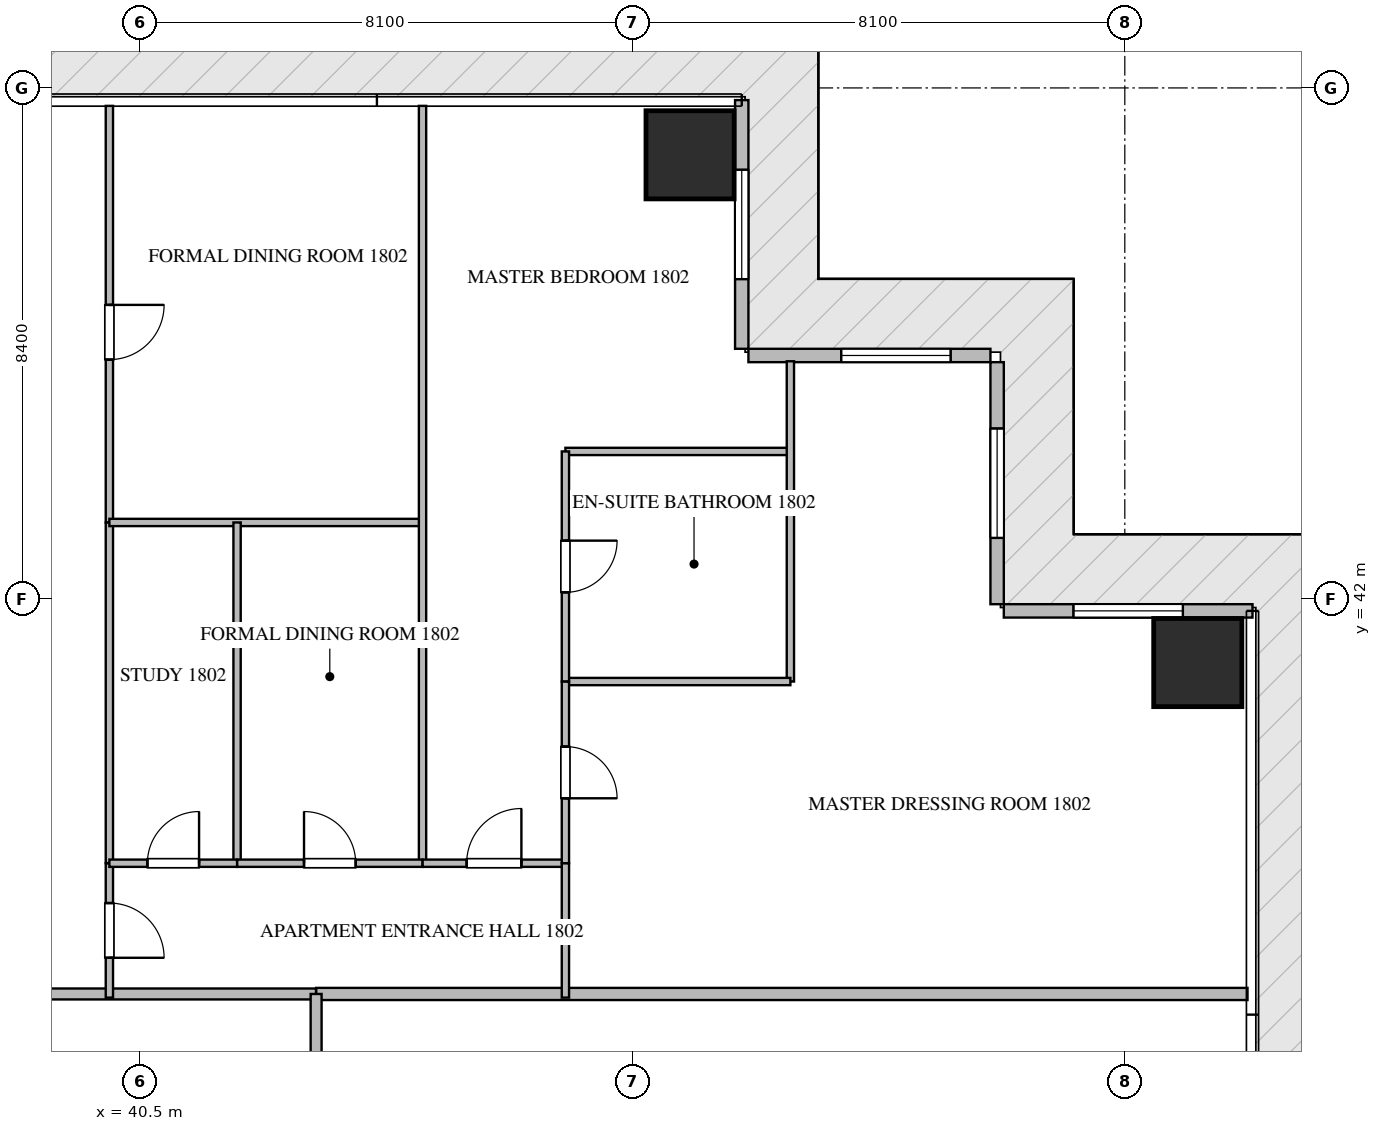
"""IFC4 building model, lengths in metres.
Left out: names, types, materials, properties, quantities, classifications, styles, units other than length and angle.
Written with IfcOpenShell. Run it as: python <this file> out.ifc"""

import sys

from ifc_helpers import new_model, si_unit, direction, frame, frame_2d, origin, origin_2d, place, context, subcontext, project, spatial, rectangle, extrude, source, transform, mapped, element, fill, save


model = new_model("IFC4")
c1 = context("Model", 3, precision=1e-05, world=origin(), true_north=direction((0.0, 1.0)))
c2 = subcontext(c1, "Body", "Model", "MODEL_VIEW")
j1 = project(units=[si_unit("LENGTHUNIT", "METRE"), si_unit("PLANEANGLEUNIT", "RADIAN")], contexts=[c1])
p1 = place(None, origin())
s1 = spatial("IfcSite", under=j1, at=p1, CompositionType="ELEMENT")
p2 = place(p1, origin())
s2 = spatial("IfcBuilding", under=s1, at=p2, CompositionType="ELEMENT")
p3 = place(p2, frame((0.0, 0.0, 75.45)))
s3 = spatial("IfcBuildingStorey", under=s2, at=p3, CompositionType="ELEMENT", Elevation=75.45)
m1 = source(origin(), c2, "Body", "SweptSolid", [
    extrude(rectangle(XDim=1.45, YDim=1.45, at=origin_2d()), origin(), (0.0, 0.0, 1.0), 3.75),
])
for number, where, z_axis, x_axis in (
    (1, (49.55, 49.3, -0.26), (0.0, 0.0, 1.0), (1.0, 0.0, 0.0)),
    (2, (57.9, 40.95, -0.26), (0.0, 0.0, 1.0), (1.0, 0.0, 0.0)),
):
    element("IfcColumn", number, at=place(p3, frame(where, z_axis=z_axis, x_axis=x_axis)), inside=s3, PredefinedType="COLUMN", context=c2, shape_type="MappedRepresentation", body=[
        mapped(m1, transform((0.0, 0.0, 0.0), scale=1.0)),
    ])
p4 = place(p3, frame((58.8, 41.8, 0.0), z_axis=(0.0, 0.0, 1.0), x_axis=(-1.0, 0.0, 0.0)))
e3 = element("IfcWall", 3, at=p4, inside=s3, PredefinedType="ELEMENTEDWALL", context=c2, shape_type="SweptSolid", body=[
    extrude(rectangle(XDim=4.09, YDim=0.22, at=frame_2d((2.045, 0.0))), origin(), (0.0, 0.0, 1.0), 3.475),
])
p5 = place(p4, frame((1.145, 0.0, 0.65)))
e4 = element("IfcOpeningElement", 4, at=p5, cuts=e3, PredefinedType="OPENING", context=c2, shape_type="SweptSolid", body=[
    extrude(rectangle(XDim=1.8, YDim=2.1, at=frame_2d((0.9, 1.05))), frame((0.0, 0.12, 0.0), z_axis=(0.0, -1.0, 0.0), x_axis=(1.0, 0.0, 0.0)), (0.0, 0.0, 1.0), 0.24),
])
p6 = place(p3, frame((54.6, 41.91, 0.0), z_axis=(0.0, 0.0, 1.0), x_axis=(0.0, 1.0, 0.0)))
e5 = element("IfcWall", 5, at=p6, inside=s3, PredefinedType="ELEMENTEDWALL", context=c2, shape_type="SweptSolid", body=[
    extrude(rectangle(XDim=3.98, YDim=0.22, at=frame_2d((1.99, 0.0))), origin(), (0.0, 0.0, 1.0), 3.475),
])
p7 = place(p6, frame((1.09, 0.0, 0.65)))
e6 = element("IfcOpeningElement", 6, at=p7, cuts=e5, PredefinedType="OPENING", context=c2, shape_type="SweptSolid", body=[
    extrude(rectangle(XDim=1.8, YDim=2.1, at=frame_2d((0.9, 1.05))), frame((0.0, 0.12, 0.0), z_axis=(0.0, -1.0, 0.0), x_axis=(1.0, 0.0, 0.0)), (0.0, 0.0, 1.0), 0.24),
])
p8 = place(p3, frame((54.49, 46.0, 0.0), z_axis=(0.0, 0.0, 1.0), x_axis=(-1.0, 0.0, 0.0)))
e7 = element("IfcWall", 7, at=p8, inside=s3, PredefinedType="ELEMENTEDWALL", context=c2, shape_type="SweptSolid", body=[
    extrude(rectangle(XDim=3.98, YDim=0.22, at=frame_2d((1.99, 0.0))), origin(), (0.0, 0.0, 1.0), 3.475),
])
p9 = place(p8, frame((0.654, 0.0, 0.65)))
e8 = element("IfcOpeningElement", 8, at=p9, cuts=e7, PredefinedType="OPENING", context=c2, shape_type="SweptSolid", body=[
    extrude(rectangle(XDim=1.8, YDim=2.1, at=frame_2d((0.9, 1.05))), frame((0.0, 0.12, 0.0), z_axis=(0.0, -1.0, 0.0), x_axis=(1.0, 0.0, 0.0)), (0.0, 0.0, 1.0), 0.24),
])
p10 = place(p3, frame((50.4, 46.11, 0.0), z_axis=(0.0, 0.0, 1.0), x_axis=(0.0, 1.0, 0.0)))
e9 = element("IfcWall", 9, at=p10, inside=s3, PredefinedType="ELEMENTEDWALL", context=c2, shape_type="SweptSolid", body=[
    extrude(rectangle(XDim=4.09, YDim=0.22, at=frame_2d((2.045, 0.0))), origin(), (0.0, 0.0, 1.0), 3.475),
])
p11 = place(p10, frame((1.145, 0.0, 0.65)))
e10 = element("IfcOpeningElement", 10, at=p11, cuts=e9, PredefinedType="OPENING", context=c2, shape_type="SweptSolid", body=[
    extrude(rectangle(XDim=1.8, YDim=2.1, at=frame_2d((0.9, 1.05))), frame((0.0, 0.12, 0.0), z_axis=(0.0, -1.0, 0.0), x_axis=(1.0, 0.0, 0.0)), (0.0, 0.0, 1.0), 0.24),
])
p12 = place(p3, frame((43.4, 35.5, 0.0), z_axis=(0.0, 0.0, 1.0), x_axis=(1.0, 0.0, 0.0)))
e11 = element("IfcWall", 11, at=p12, inside=s3, PredefinedType="PARTITIONING", context=c2, shape_type="SweptSolid", body=[
    extrude(rectangle(XDim=15.318, YDim=0.2, at=frame_2d((7.659, 0.0))), origin(), (0.0, 0.0, 1.0), 3.49),
])
p13 = place(p3, frame((21.402, 35.5, 0.0), z_axis=(0.0, 0.0, 1.0), x_axis=(1.0, 0.0, 0.0)))
e12 = element("IfcWall", 12, at=p13, inside=s3, PredefinedType="PARTITIONING", context=c2, shape_type="SweptSolid", body=[
    extrude(rectangle(XDim=21.996, YDim=0.18, at=frame_2d((10.998, 0.0))), origin(), (0.0, 0.0, 1.0), 3.49),
])
p14 = place(p13, frame((15.222, 0.0, 0.0)))
e13 = element("IfcOpeningElement", 13, at=p14, cuts=e12, PredefinedType="OPENING", context=c2, shape_type="SweptSolid", body=[
    extrude(rectangle(XDim=1.0, YDim=2.15, at=frame_2d((0.5, 1.075))), frame((0.0, 0.1, 0.0), z_axis=(0.0, -1.0, 0.0), x_axis=(1.0, 0.0, 0.0)), (0.0, 0.0, 1.0), 0.2),
])
p15 = place(p3, frame((43.4, 14.9, 0.0), z_axis=(0.0, 0.0, 1.0), x_axis=(0.0, 1.0, 0.0)))
e14 = element("IfcWall", 14, at=p15, inside=s3, PredefinedType="PARTITIONING", context=c2, shape_type="SweptSolid", body=[
    extrude(rectangle(XDim=20.6, YDim=0.18, at=frame_2d((10.3, 0.0))), origin(), (0.0, 0.0, 1.0), 3.49),
])
p16 = place(p15, frame((17.64, 0.0, 0.0)))
e15 = element("IfcOpeningElement", 15, at=p16, cuts=e14, PredefinedType="OPENING", context=c2, shape_type="SweptSolid", body=[
    extrude(rectangle(XDim=1.0, YDim=2.15, at=frame_2d((0.5, 1.075))), frame((0.0, 0.1, 0.0), z_axis=(0.0, -1.0, 0.0), x_axis=(1.0, 0.0, 0.0)), (0.0, 0.0, 1.0), 0.2),
])
p17 = place(p3, frame((40.0, 37.65, 0.0), z_axis=(0.0, 0.0, 1.0), x_axis=(0.0, -1.0, 0.0)))
e16 = element("IfcWall", 16, at=p17, inside=s3, PredefinedType="PARTITIONING", context=c2, shape_type="SweptSolid", body=[
    extrude(rectangle(XDim=2.21, YDim=0.12, at=frame_2d((1.105, 0.0))), origin(), (0.0, 0.0, 1.0), 3.49),
])
p18 = place(p17, frame((0.655, 0.0, 0.0)))
e17 = element("IfcOpeningElement", 17, at=p18, cuts=e16, PredefinedType="OPENING", context=c2, shape_type="SweptSolid", body=[
    extrude(rectangle(XDim=0.9, YDim=2.1, at=frame_2d((0.45, 1.05))), frame((0.0, 0.07, 0.0), z_axis=(0.0, -1.0, 0.0), x_axis=(1.0, 0.0, 0.0)), (0.0, 0.0, 1.0), 0.14),
])
p19 = place(p3, frame((40.0, 50.105, 0.0), z_axis=(0.0, 0.0, 1.0), x_axis=(0.0, -1.0, 0.0)))
e18 = element("IfcWall", 18, at=p19, inside=s3, PredefinedType="PARTITIONING", context=c2, shape_type="SweptSolid", body=[
    extrude(rectangle(XDim=6.851, YDim=0.12, at=frame_2d((3.426, 0.0))), origin(), (0.0, 0.0, 1.0), 3.49),
])
p20 = place(p19, frame((3.273, 0.0, 0.0)))
e19 = element("IfcOpeningElement", 19, at=p20, cuts=e18, PredefinedType="OPENING", context=c2, shape_type="SweptSolid", body=[
    extrude(rectangle(XDim=0.9, YDim=2.1, at=frame_2d((0.45, 1.05))), frame((0.0, 0.07, 0.0), z_axis=(0.0, -1.0, 0.0), x_axis=(1.0, 0.0, 0.0)), (0.0, 0.0, 1.0), 0.14),
])
p21 = place(p3, frame((40.0, 43.252, 0.0), z_axis=(0.0, 0.0, 1.0), x_axis=(0.0, -1.0, 0.0)))
e20 = element("IfcWall", 20, at=p21, inside=s3, PredefinedType="PARTITIONING", context=c2, shape_type="SweptSolid", body=[
    extrude(rectangle(XDim=5.6, YDim=0.12, at=frame_2d((2.8, 0.0))), origin(), (0.0, 0.0, 1.0), 3.49),
])
p22 = place(p3, frame((40.0, 43.254, 0.0), z_axis=(0.0, 0.0, 1.0), x_axis=(1.0, 0.0, 0.0)))
e21 = element("IfcWall", 21, at=p22, inside=s3, PredefinedType="PARTITIONING", context=c2, shape_type="SweptSolid", body=[
    extrude(rectangle(XDim=5.15, YDim=0.12, at=frame_2d((2.575, 0.0))), origin(), (0.0, 0.0, 1.0), 3.49),
])
p23 = place(p3, frame((45.15, 50.105, 0.0), z_axis=(0.0, 0.0, 1.0), x_axis=(0.0, -1.0, 0.0)))
e22 = element("IfcWall", 22, at=p23, inside=s3, PredefinedType="PARTITIONING", context=c2, shape_type="SweptSolid", body=[
    extrude(rectangle(XDim=12.455, YDim=0.12, at=frame_2d((6.228, 0.0))), origin(), (0.0, 0.0, 1.0), 3.49),
])
p24 = place(p3, frame((42.1, 43.254, 0.0), z_axis=(0.0, 0.0, 1.0), x_axis=(0.0, -1.0, 0.0)))
e23 = element("IfcWall", 23, at=p24, inside=s3, PredefinedType="PARTITIONING", context=c2, shape_type="SweptSolid", body=[
    extrude(rectangle(XDim=5.604, YDim=0.12, at=frame_2d((2.802, 0.0))), origin(), (0.0, 0.0, 1.0), 3.49),
])
p25 = place(p3, frame((40.0, 37.65, 0.0), z_axis=(0.0, 0.0, 1.0), x_axis=(1.0, 0.0, 0.0)))
e24 = element("IfcWall", 24, at=p25, inside=s3, PredefinedType="PARTITIONING", context=c2, shape_type="SweptSolid", body=[
    extrude(rectangle(XDim=2.1, YDim=0.12, at=frame_2d((1.05, 0.0))), origin(), (0.0, 0.0, 1.0), 3.49),
])
p26 = place(p25, frame((0.625, 0.0, 0.0)))
e25 = element("IfcOpeningElement", 25, at=p26, cuts=e24, PredefinedType="OPENING", context=c2, shape_type="SweptSolid", body=[
    extrude(rectangle(XDim=0.85, YDim=2.1, at=frame_2d((0.425, 1.05))), frame((0.0, 0.07, 0.0), z_axis=(0.0, -1.0, 0.0), x_axis=(1.0, 0.0, 0.0)), (0.0, 0.0, 1.0), 0.14),
])
p27 = place(p3, frame((42.102, 37.65, 0.0), z_axis=(0.0, 0.0, 1.0), x_axis=(1.0, 0.0, 0.0)))
e26 = element("IfcWall", 26, at=p27, inside=s3, PredefinedType="PARTITIONING", context=c2, shape_type="SweptSolid", body=[
    extrude(rectangle(XDim=3.048, YDim=0.12, at=frame_2d((1.524, 0.0))), origin(), (0.0, 0.0, 1.0), 3.49),
])
p28 = place(p27, frame((1.099, 0.0, 0.0)))
e27 = element("IfcOpeningElement", 27, at=p28, cuts=e26, PredefinedType="OPENING", context=c2, shape_type="SweptSolid", body=[
    extrude(rectangle(XDim=0.85, YDim=2.1, at=frame_2d((0.425, 1.05))), frame((0.0, 0.07, 0.0), z_axis=(0.0, -1.0, 0.0), x_axis=(1.0, 0.0, 0.0)), (0.0, 0.0, 1.0), 0.14),
])
p29 = place(p3, frame((45.152, 37.65, 0.0), z_axis=(0.0, 0.0, 1.0), x_axis=(1.0, 0.0, 0.0)))
e28 = element("IfcWall", 28, at=p29, inside=s3, PredefinedType="PARTITIONING", context=c2, shape_type="SweptSolid", body=[
    extrude(rectangle(XDim=2.348, YDim=0.12, at=frame_2d((1.174, 0.0))), origin(), (0.0, 0.0, 1.0), 3.49),
])
p30 = place(p29, frame((0.724, 0.0, 0.0)))
e29 = element("IfcOpeningElement", 29, at=p30, cuts=e28, PredefinedType="OPENING", context=c2, shape_type="SweptSolid", body=[
    extrude(rectangle(XDim=0.9, YDim=2.1, at=frame_2d((0.45, 1.05))), frame((0.0, 0.07, 0.0), z_axis=(0.0, -1.0, 0.0), x_axis=(1.0, 0.0, 0.0)), (0.0, 0.0, 1.0), 0.14),
])
p31 = place(p3, frame((47.5, 44.422, 0.0), z_axis=(0.0, 0.0, 1.0), x_axis=(1.0, 0.0, 0.0)))
e30 = element("IfcWall", 30, at=p31, inside=s3, PredefinedType="PARTITIONING", context=c2, shape_type="SweptSolid", body=[
    extrude(rectangle(XDim=3.7, YDim=0.12, at=frame_2d((1.85, 0.0))), origin(), (0.0, 0.0, 1.0), 3.49),
])
p32 = place(p3, frame((51.2, 45.905, 0.0), z_axis=(0.0, 0.0, 1.0), x_axis=(0.0, -1.0, 0.0)))
e31 = element("IfcWall", 31, at=p32, inside=s3, PredefinedType="PARTITIONING", context=c2, shape_type="SweptSolid", body=[
    extrude(rectangle(XDim=5.267, YDim=0.12, at=frame_2d((2.634, 0.0))), origin(), (0.0, 0.0, 1.0), 3.49),
])
p33 = place(p3, frame((47.5, 40.638, 0.0), z_axis=(0.0, 0.0, 1.0), x_axis=(1.0, 0.0, 0.0)))
e32 = element("IfcWall", 32, at=p33, inside=s3, PredefinedType="PARTITIONING", context=c2, shape_type="SweptSolid", body=[
    extrude(rectangle(XDim=3.7, YDim=0.12, at=frame_2d((1.85, 0.0))), origin(), (0.0, 0.0, 1.0), 3.49),
])
p34 = place(p3, frame((47.5, 44.422, 0.0), z_axis=(0.0, 0.0, 1.0), x_axis=(0.0, -1.0, 0.0)))
e33 = element("IfcWall", 33, at=p34, inside=s3, PredefinedType="PARTITIONING", context=c2, shape_type="SweptSolid", body=[
    extrude(rectangle(XDim=3.784, YDim=0.12, at=frame_2d((1.892, 0.0))), origin(), (0.0, 0.0, 1.0), 3.49),
])
p35 = place(p34, frame((1.467, 0.0, 0.0)))
e34 = element("IfcOpeningElement", 34, at=p35, cuts=e33, PredefinedType="OPENING", context=c2, shape_type="SweptSolid", body=[
    extrude(rectangle(XDim=0.85, YDim=2.1, at=frame_2d((0.425, 1.05))), frame((0.0, 0.07, 0.0), z_axis=(0.0, -1.0, 0.0), x_axis=(1.0, 0.0, 0.0)), (0.0, 0.0, 1.0), 0.14),
])
p36 = place(p3, frame((47.5, 40.636, 0.0), z_axis=(0.0, 0.0, 1.0), x_axis=(0.0, -1.0, 0.0)))
e35 = element("IfcWall", 35, at=p36, inside=s3, PredefinedType="PARTITIONING", context=c2, shape_type="SweptSolid", body=[
    extrude(rectangle(XDim=2.986, YDim=0.12, at=frame_2d((1.493, 0.0))), origin(), (0.0, 0.0, 1.0), 3.49),
])
p37 = place(p36, frame((1.068, 0.0, 0.0)))
e36 = element("IfcOpeningElement", 36, at=p37, cuts=e35, PredefinedType="OPENING", context=c2, shape_type="SweptSolid", body=[
    extrude(rectangle(XDim=0.85, YDim=2.1, at=frame_2d((0.425, 1.05))), frame((0.0, 0.07, 0.0), z_axis=(0.0, -1.0, 0.0), x_axis=(1.0, 0.0, 0.0)), (0.0, 0.0, 1.0), 0.14),
])
p38 = place(p3, frame((47.5, 37.648, 0.0), z_axis=(0.0, 0.0, 1.0), x_axis=(0.0, -1.0, 0.0)))
e37 = element("IfcWall", 37, at=p38, inside=s3, PredefinedType="PARTITIONING", context=c2, shape_type="SweptSolid", body=[
    extrude(rectangle(XDim=2.208, YDim=0.12, at=frame_2d((1.104, 0.0))), origin(), (0.0, 0.0, 1.0), 3.49),
])
m2 = source(origin(), c2, "Body", "SweptSolid", [
    extrude(rectangle(XDim=1.8, YDim=2.1, at=frame_2d((0.9, 1.05))), frame((0.0, 0.03, 0.0), z_axis=(0.0, -1.0, 0.0), x_axis=(1.0, 0.0, 0.0)), (0.0, 0.0, 1.0), 0.06),
])
p39 = place(p5, origin())
e38 = element("IfcWindow", 38, at=p39, inside=s3, PartitioningType="SINGLE_PANEL", PredefinedType="WINDOW", context=c2, shape_type="MappedRepresentation", body=[
    mapped(m2, transform((0.0, 0.0, 0.0), scale=1.0)),
])
fill(e4, e38)
p40 = place(p7, origin())
e39 = element("IfcWindow", 39, at=p40, inside=s3, PartitioningType="SINGLE_PANEL", PredefinedType="WINDOW", context=c2, shape_type="MappedRepresentation", body=[
    mapped(m2, transform((0.0, 0.0, 0.0), scale=1.0)),
])
fill(e6, e39)
p41 = place(p9, origin())
e40 = element("IfcWindow", 40, at=p41, inside=s3, PartitioningType="SINGLE_PANEL", PredefinedType="WINDOW", context=c2, shape_type="MappedRepresentation", body=[
    mapped(m2, transform((0.0, 0.0, 0.0), scale=1.0)),
])
fill(e8, e40)
p42 = place(p11, origin())
e41 = element("IfcWindow", 41, at=p42, inside=s3, PartitioningType="SINGLE_PANEL", PredefinedType="WINDOW", context=c2, shape_type="MappedRepresentation", body=[
    mapped(m2, transform((0.0, 0.0, 0.0), scale=1.0)),
])
fill(e10, e41)
m3 = source(origin(), c2, "Body", "SweptSolid", [
    extrude(rectangle(XDim=0.9, YDim=2.1, at=frame_2d((0.45, 1.05))), frame((0.0, 0.025, 0.0), z_axis=(0.0, -1.0, 0.0), x_axis=(1.0, 0.0, 0.0)), (0.0, 0.0, 1.0), 0.05),
])
p43 = place(p18, origin())
e42 = element("IfcDoor", 42, at=p43, inside=s3, OperationType="SINGLE_SWING_RIGHT", PredefinedType="DOOR", context=c2, shape_type="MappedRepresentation", body=[
    mapped(m3, transform((0.0, 0.0, 0.0), scale=1.0)),
])
fill(e17, e42)
p44 = place(p20, origin())
e43 = element("IfcDoor", 43, at=p44, inside=s3, OperationType="SINGLE_SWING_LEFT", PredefinedType="DOOR", context=c2, shape_type="MappedRepresentation", body=[
    mapped(m3, transform((0.0, 0.0, 0.0), scale=1.0)),
])
fill(e19, e43)
m4 = source(origin(), c2, "Body", "SweptSolid", [
    extrude(rectangle(XDim=0.85, YDim=2.1, at=frame_2d((0.425, 1.05))), frame((0.0, 0.025, 0.0), z_axis=(0.0, -1.0, 0.0), x_axis=(1.0, 0.0, 0.0)), (0.0, 0.0, 1.0), 0.05),
])
p45 = place(p26, origin())
e44 = element("IfcDoor", 44, at=p45, inside=s3, OperationType="SINGLE_SWING_RIGHT", PredefinedType="DOOR", context=c2, shape_type="MappedRepresentation", body=[
    mapped(m4, transform((0.0, 0.0, 0.0), scale=1.0)),
])
fill(e25, e44)
p46 = place(p28, origin())
e45 = element("IfcDoor", 45, at=p46, inside=s3, OperationType="SINGLE_SWING_LEFT", PredefinedType="DOOR", context=c2, shape_type="MappedRepresentation", body=[
    mapped(m4, transform((0.0, 0.0, 0.0), scale=1.0)),
])
fill(e27, e45)
p47 = place(p30, origin())
e46 = element("IfcDoor", 46, at=p47, inside=s3, OperationType="SINGLE_SWING_RIGHT", PredefinedType="DOOR", context=c2, shape_type="MappedRepresentation", body=[
    mapped(m3, transform((0.0, 0.0, 0.0), scale=1.0)),
])
fill(e29, e46)
p48 = place(p35, origin())
e47 = element("IfcDoor", 47, at=p48, inside=s3, OperationType="SINGLE_SWING_LEFT", PredefinedType="DOOR", context=c2, shape_type="MappedRepresentation", body=[
    mapped(m4, transform((0.0, 0.0, 0.0), scale=1.0)),
])
fill(e34, e47)
p49 = place(p37, origin())
e48 = element("IfcDoor", 48, at=p49, inside=s3, OperationType="SINGLE_SWING_RIGHT", PredefinedType="DOOR", context=c2, shape_type="MappedRepresentation", body=[
    mapped(m4, transform((0.0, 0.0, 0.0), scale=1.0)),
])
fill(e36, e48)
save(model, sys.argv[1])
